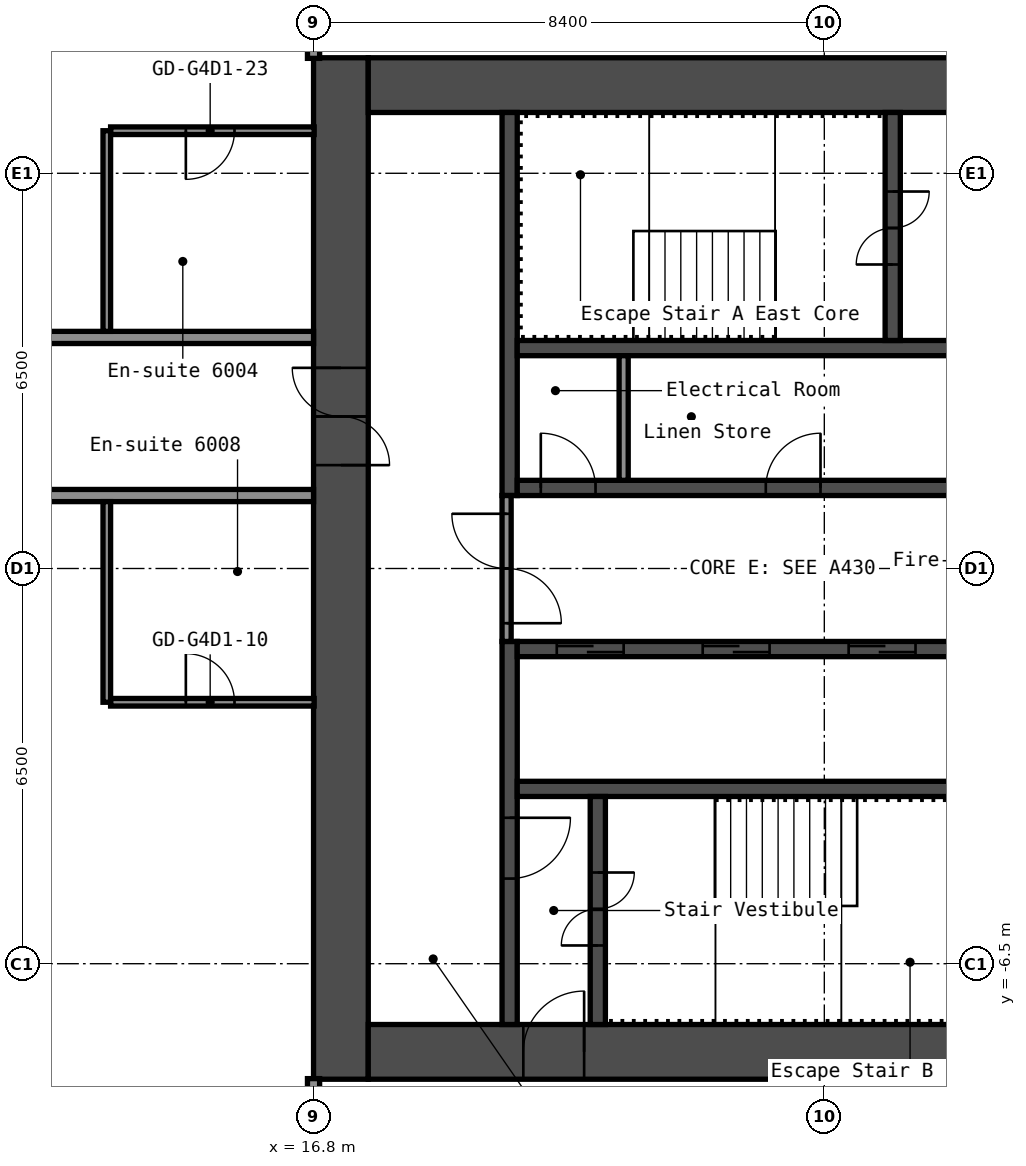
"""IFC4 building model, lengths in metres.
Left out: names, types, materials, properties, quantities, classifications, styles, units other than length and angle.
Written with IfcOpenShell. Run it as: python <this file> out.ifc"""

import sys

from ifc_helpers import new_model, si_unit, direction, frame, frame_2d, origin, place, context, subcontext, project, spatial, rectangle, extrude, element, fill, save


model = new_model("IFC4")
c1 = context("Model", 3, precision=1e-05, world=origin(), true_north=direction((0.0, 1.0)))
c2 = subcontext(c1, "Body", "Model", "MODEL_VIEW")
j1 = project(units=[si_unit("LENGTHUNIT", "METRE"), si_unit("PLANEANGLEUNIT", "RADIAN")], contexts=[c1])
p1 = place(None, origin())
s1 = spatial("IfcSite", under=j1, at=p1, CompositionType="ELEMENT")
p2 = place(p1, origin())
s2 = spatial("IfcBuilding", under=s1, at=p2, CompositionType="ELEMENT")
p3 = place(p2, frame((0.0, 0.0, 212.2)))
s3 = spatial("IfcBuildingStorey", under=s2, at=p3, CompositionType="ELEMENT", Elevation=212.2)
p4 = place(p3, frame((17.25, -8.4, 0.0), z_axis=(0.0, 0.0, 1.0), x_axis=(0.0, 1.0, 0.0)))
e1 = element("IfcWall", 1, at=p4, inside=s3, PredefinedType="SHEAR", context=c2, shape_type="SweptSolid", body=[
    extrude(rectangle(XDim=16.8, YDim=0.9, at=frame_2d((8.4, 0.0))), origin(), (0.0, 0.0, 1.0), 2.75),
])
p5 = place(p4, frame((10.1, 0.0, 0.0)))
e2 = element("IfcOpeningElement", 2, at=p5, cuts=e1, PredefinedType="OPENING", context=c2, shape_type="SweptSolid", body=[
    extrude(rectangle(XDim=1.6, YDim=2.1, at=frame_2d((0.8, 1.05))), frame((0.0, 0.46, 0.0), z_axis=(0.0, -1.0, 0.0), x_axis=(1.0, 0.0, 0.0)), (0.0, 0.0, 1.0), 0.92),
])
p6 = place(p3, frame((17.7, 7.95, 0.0), z_axis=(0.0, 0.0, 1.0), x_axis=(1.0, 0.0, 0.0)))
e3 = element("IfcWall", 3, at=p6, inside=s3, PredefinedType="SHEAR", context=c2, shape_type="SweptSolid", body=[
    extrude(rectangle(XDim=15.0, YDim=0.9, at=frame_2d((7.5, 0.0))), origin(), (0.0, 0.0, 1.0), 2.75),
])
p7 = place(p6, frame((10.4, 0.0, 0.0)))
e4 = element("IfcOpeningElement", 4, at=p7, cuts=e3, PredefinedType="OPENING", context=c2, shape_type="SweptSolid", body=[
    extrude(rectangle(XDim=1.2, YDim=2.1, at=frame_2d((0.6, 1.05))), frame((0.0, 0.46, 0.0), z_axis=(0.0, -1.0, 0.0), x_axis=(1.0, 0.0, 0.0)), (0.0, 0.0, 1.0), 0.92),
])
p8 = place(p6, frame((13.35, 0.0, 0.0)))
e5 = element("IfcOpeningElement", 5, at=p8, cuts=e3, PredefinedType="OPENING", context=c2, shape_type="SweptSolid", body=[
    extrude(rectangle(XDim=0.9, YDim=2.1, at=frame_2d((0.45, 1.05))), frame((0.0, 0.46, 0.0), z_axis=(0.0, -1.0, 0.0), x_axis=(1.0, 0.0, 0.0)), (0.0, 0.0, 1.0), 0.92),
])
p9 = place(p3, frame((17.7, -7.95, 0.0), z_axis=(0.0, 0.0, 1.0), x_axis=(1.0, 0.0, 0.0)))
e6 = element("IfcWall", 6, at=p9, inside=s3, PredefinedType="SHEAR", context=c2, shape_type="SweptSolid", body=[
    extrude(rectangle(XDim=15.0, YDim=0.9, at=frame_2d((7.5, 0.0))), origin(), (0.0, 0.0, 1.0), 2.75),
])
p10 = place(p9, frame((2.55, 0.0, 0.0)))
e7 = element("IfcOpeningElement", 7, at=p10, cuts=e6, PredefinedType="OPENING", context=c2, shape_type="SweptSolid", body=[
    extrude(rectangle(XDim=1.0, YDim=2.1, at=frame_2d((0.5, 1.05))), frame((0.0, 0.46, 0.0), z_axis=(0.0, -1.0, 0.0), x_axis=(1.0, 0.0, 0.0)), (0.0, 0.0, 1.0), 0.92),
])
p11 = place(p3, frame((20.025, 1.2, 0.0), z_axis=(0.0, 0.0, 1.0), x_axis=(0.0, 1.0, 0.0)))
e8 = element("IfcWall", 8, at=p11, inside=s3, PredefinedType="SHEAR", context=c2, shape_type="SweptSolid", body=[
    extrude(rectangle(XDim=6.3, YDim=0.25, at=frame_2d((3.15, 0.0))), origin(), (0.0, 0.0, 1.0), 2.75),
])
p12 = place(p3, frame((20.025, -7.5, 0.0), z_axis=(0.0, 0.0, 1.0), x_axis=(0.0, 1.0, 0.0)))
e9 = element("IfcWall", 9, at=p12, inside=s3, PredefinedType="SHEAR", context=c2, shape_type="SweptSolid", body=[
    extrude(rectangle(XDim=6.3, YDim=0.25, at=frame_2d((3.15, 0.0))), origin(), (0.0, 0.0, 1.0), 2.75),
])
p13 = place(p12, frame((2.4, 0.0, 0.0)))
e10 = element("IfcOpeningElement", 10, at=p13, cuts=e9, PredefinedType="OPENING", context=c2, shape_type="SweptSolid", body=[
    extrude(rectangle(XDim=1.0, YDim=2.1, at=frame_2d((0.5, 1.05))), frame((0.0, 0.135, 0.0), z_axis=(0.0, -1.0, 0.0), x_axis=(1.0, 0.0, 0.0)), (0.0, 0.0, 1.0), 0.27),
])
p14 = place(p3, frame((20.15, 1.325, 0.0), z_axis=(0.0, 0.0, 1.0), x_axis=(1.0, 0.0, 0.0)))
e11 = element("IfcWall", 11, at=p14, inside=s3, PredefinedType="SHEAR", context=c2, shape_type="SweptSolid", body=[
    extrude(rectangle(XDim=7.5, YDim=0.25, at=frame_2d((3.75, 0.0))), origin(), (0.0, 0.0, 1.0), 2.75),
])
p15 = place(p14, frame((0.387, 0.0, 0.0)))
e12 = element("IfcOpeningElement", 12, at=p15, cuts=e11, PredefinedType="OPENING", context=c2, shape_type="SweptSolid", body=[
    extrude(rectangle(XDim=0.9, YDim=2.1, at=frame_2d((0.45, 1.05))), frame((0.0, 0.135, 0.0), z_axis=(0.0, -1.0, 0.0), x_axis=(1.0, 0.0, 0.0)), (0.0, 0.0, 1.0), 0.27),
])
p16 = place(p14, frame((4.087, 0.0, 0.0)))
e13 = element("IfcOpeningElement", 13, at=p16, cuts=e11, PredefinedType="OPENING", context=c2, shape_type="SweptSolid", body=[
    extrude(rectangle(XDim=0.9, YDim=2.1, at=frame_2d((0.45, 1.05))), frame((0.0, 0.135, 0.0), z_axis=(0.0, -1.0, 0.0), x_axis=(1.0, 0.0, 0.0)), (0.0, 0.0, 1.0), 0.27),
])
p17 = place(p3, frame((20.15, 3.625, 0.0), z_axis=(0.0, 0.0, 1.0), x_axis=(1.0, 0.0, 0.0)))
e14 = element("IfcWall", 14, at=p17, inside=s3, PredefinedType="SHEAR", context=c2, shape_type="SweptSolid", body=[
    extrude(rectangle(XDim=7.5, YDim=0.25, at=frame_2d((3.75, 0.0))), origin(), (0.0, 0.0, 1.0), 2.75),
])
p18 = place(p3, frame((26.325, 3.75, 0.0), z_axis=(0.0, 0.0, 1.0), x_axis=(0.0, 1.0, 0.0)))
e15 = element("IfcWall", 15, at=p18, inside=s3, PredefinedType="SHEAR", context=c2, shape_type="SweptSolid", body=[
    extrude(rectangle(XDim=3.75, YDim=0.25, at=frame_2d((1.875, 0.0))), origin(), (0.0, 0.0, 1.0), 2.75),
])
p19 = place(p18, frame((1.25, 0.0, 0.0)))
e16 = element("IfcOpeningElement", 16, at=p19, cuts=e15, PredefinedType="OPENING", context=c2, shape_type="SweptSolid", body=[
    extrude(rectangle(XDim=1.2, YDim=2.1, at=frame_2d((0.6, 1.05))), frame((0.0, 0.135, 0.0), z_axis=(0.0, -1.0, 0.0), x_axis=(1.0, 0.0, 0.0)), (0.0, 0.0, 1.0), 0.27),
])
p20 = place(p3, frame((20.15, -1.325, 0.0), z_axis=(0.0, 0.0, 1.0), x_axis=(1.0, 0.0, 0.0)))
e17 = element("IfcWall", 17, at=p20, inside=s3, PredefinedType="SHEAR", context=c2, shape_type="SweptSolid", body=[
    extrude(rectangle(XDim=7.5, YDim=0.25, at=frame_2d((3.75, 0.0))), origin(), (0.0, 0.0, 1.0), 2.75),
])
p21 = place(p20, frame((0.65, 0.0, 0.0)))
e18 = element("IfcOpeningElement", 18, at=p21, cuts=e17, PredefinedType="OPENING", context=c2, shape_type="SweptSolid", body=[
    extrude(rectangle(XDim=1.1, YDim=2.1, at=frame_2d((0.55, 1.05))), frame((0.0, 0.135, 0.0), z_axis=(0.0, -1.0, 0.0), x_axis=(1.0, 0.0, 0.0)), (0.0, 0.0, 1.0), 0.27),
])
p22 = place(p20, frame((3.05, 0.0, 0.0)))
e19 = element("IfcOpeningElement", 19, at=p22, cuts=e17, PredefinedType="OPENING", context=c2, shape_type="SweptSolid", body=[
    extrude(rectangle(XDim=1.1, YDim=2.1, at=frame_2d((0.55, 1.05))), frame((0.0, 0.135, 0.0), z_axis=(0.0, -1.0, 0.0), x_axis=(1.0, 0.0, 0.0)), (0.0, 0.0, 1.0), 0.27),
])
p23 = place(p20, frame((5.45, 0.0, 0.0)))
e20 = element("IfcOpeningElement", 20, at=p23, cuts=e17, PredefinedType="OPENING", context=c2, shape_type="SweptSolid", body=[
    extrude(rectangle(XDim=1.1, YDim=2.1, at=frame_2d((0.55, 1.05))), frame((0.0, 0.135, 0.0), z_axis=(0.0, -1.0, 0.0), x_axis=(1.0, 0.0, 0.0)), (0.0, 0.0, 1.0), 0.27),
])
p24 = place(p3, frame((20.15, -3.625, 0.0), z_axis=(0.0, 0.0, 1.0), x_axis=(1.0, 0.0, 0.0)))
e21 = element("IfcWall", 21, at=p24, inside=s3, PredefinedType="SHEAR", context=c2, shape_type="SweptSolid", body=[
    extrude(rectangle(XDim=7.5, YDim=0.25, at=frame_2d((3.75, 0.0))), origin(), (0.0, 0.0, 1.0), 2.75),
])
p25 = place(p3, frame((21.475, -7.5, 0.0), z_axis=(0.0, 0.0, 1.0), x_axis=(0.0, 1.0, 0.0)))
e22 = element("IfcWall", 22, at=p25, inside=s3, PredefinedType="SHEAR", context=c2, shape_type="SweptSolid", body=[
    extrude(rectangle(XDim=3.75, YDim=0.25, at=frame_2d((1.875, 0.0))), origin(), (0.0, 0.0, 1.0), 2.75),
])
p26 = place(p25, frame((1.3, 0.0, 0.0)))
e23 = element("IfcOpeningElement", 23, at=p26, cuts=e22, PredefinedType="OPENING", context=c2, shape_type="SweptSolid", body=[
    extrude(rectangle(XDim=1.2, YDim=2.1, at=frame_2d((0.6, 1.05))), frame((0.0, 0.135, 0.0), z_axis=(0.0, -1.0, 0.0), x_axis=(1.0, 0.0, 0.0)), (0.0, 0.0, 1.0), 0.27),
])
p27 = place(p3, frame((19.975, -1.2, 0.0), z_axis=(0.0, 0.0, 1.0), x_axis=(0.0, 1.0, 0.0)))
e24 = element("IfcWall", 24, at=p27, inside=s3, PredefinedType="PARTITIONING", context=c2, shape_type="SweptSolid", body=[
    extrude(rectangle(XDim=2.4, YDim=0.15, at=frame_2d((1.2, 0.0))), origin(), (0.0, 0.0, 1.0), 2.75),
])
p28 = place(p27, frame((0.3, 0.0, 0.0)))
e25 = element("IfcOpeningElement", 25, at=p28, cuts=e24, PredefinedType="OPENING", context=c2, shape_type="SweptSolid", body=[
    extrude(rectangle(XDim=1.8, YDim=2.1, at=frame_2d((0.9, 1.05))), frame((0.0, 0.085, 0.0), z_axis=(0.0, -1.0, 0.0), x_axis=(1.0, 0.0, 0.0)), (0.0, 0.0, 1.0), 0.17),
])
p29 = place(p3, frame((21.9, 1.45, 0.0), z_axis=(0.0, 0.0, 1.0), x_axis=(0.0, 1.0, 0.0)))
e26 = element("IfcWall", 26, at=p29, inside=s3, PredefinedType="PARTITIONING", context=c2, shape_type="SweptSolid", body=[
    extrude(rectangle(XDim=2.05, YDim=0.15, at=frame_2d((1.025, 0.0))), origin(), (0.0, 0.0, 1.0), 2.75),
])
p30 = place(p3, frame((13.462, -2.2, 0.0), z_axis=(0.0, 0.0, 1.0), x_axis=(1.0, 0.0, 0.0)))
e27 = element("IfcWall", 27, at=p30, inside=s3, PredefinedType="PARTITIONING", context=c2, shape_type="SweptSolid", body=[
    extrude(rectangle(XDim=3.348, YDim=0.125, at=frame_2d((1.674, 0.0))), origin(), (0.0, 0.0, 1.0), 2.75),
])
p31 = place(p30, frame((1.238, 0.0, 0.0)))
e28 = element("IfcOpeningElement", 28, at=p31, cuts=e27, PredefinedType="OPENING", context=c2, shape_type="SweptSolid", body=[
    extrude(rectangle(XDim=0.8, YDim=2.1, at=frame_2d((0.4, 1.05))), frame((0.0, 0.073, 0.0), z_axis=(0.0, -1.0, 0.0), x_axis=(1.0, 0.0, 0.0)), (0.0, 0.0, 1.0), 0.145),
])
p32 = place(p3, frame((-16.8, 1.2, 0.0), z_axis=(0.0, 0.0, 1.0), x_axis=(1.0, 0.0, 0.0)))
e29 = element("IfcWall", 29, at=p32, inside=s3, PredefinedType="PARTITIONING", context=c2, shape_type="SweptSolid", body=[
    extrude(rectangle(XDim=33.6, YDim=0.2, at=frame_2d((16.8, 0.0))), origin(), (0.0, 0.0, 1.0), 2.75),
])
p33 = place(p32, frame((2.85, 0.0, 0.0)))
e30 = element("IfcOpeningElement", 30, at=p33, cuts=e29, PredefinedType="OPENING", context=c2, shape_type="SweptSolid", body=[
    extrude(rectangle(XDim=1.0, YDim=2.1, at=frame_2d((0.5, 1.05))), frame((0.0, 0.11, 0.0), z_axis=(0.0, -1.0, 0.0), x_axis=(1.0, 0.0, 0.0)), (0.0, 0.0, 1.0), 0.22),
])
p34 = place(p32, frame((4.55, 0.0, 0.0)))
e31 = element("IfcOpeningElement", 31, at=p34, cuts=e29, PredefinedType="OPENING", context=c2, shape_type="SweptSolid", body=[
    extrude(rectangle(XDim=1.0, YDim=2.1, at=frame_2d((0.5, 1.05))), frame((0.0, 0.11, 0.0), z_axis=(0.0, -1.0, 0.0), x_axis=(1.0, 0.0, 0.0)), (0.0, 0.0, 1.0), 0.22),
])
p35 = place(p32, frame((12.1, 0.0, 0.0)))
e32 = element("IfcOpeningElement", 32, at=p35, cuts=e29, PredefinedType="OPENING", context=c2, shape_type="SweptSolid", body=[
    extrude(rectangle(XDim=1.0, YDim=2.1, at=frame_2d((0.5, 1.05))), frame((0.0, 0.11, 0.0), z_axis=(0.0, -1.0, 0.0), x_axis=(1.0, 0.0, 0.0)), (0.0, 0.0, 1.0), 0.22),
])
p36 = place(p32, frame((22.3, 0.0, 0.0)))
e33 = element("IfcOpeningElement", 33, at=p36, cuts=e29, PredefinedType="OPENING", context=c2, shape_type="SweptSolid", body=[
    extrude(rectangle(XDim=1.0, YDim=2.1, at=frame_2d((0.5, 1.05))), frame((0.0, 0.11, 0.0), z_axis=(0.0, -1.0, 0.0), x_axis=(1.0, 0.0, 0.0)), (0.0, 0.0, 1.0), 0.22),
])
p37 = place(p32, frame((27.2, 0.0, 0.0)))
e34 = element("IfcOpeningElement", 34, at=p37, cuts=e29, PredefinedType="OPENING", context=c2, shape_type="SweptSolid", body=[
    extrude(rectangle(XDim=1.0, YDim=2.1, at=frame_2d((0.5, 1.05))), frame((0.0, 0.11, 0.0), z_axis=(0.0, -1.0, 0.0), x_axis=(1.0, 0.0, 0.0)), (0.0, 0.0, 1.0), 0.22),
])
p38 = place(p3, frame((-16.8, 3.8, 0.0), z_axis=(0.0, 0.0, 1.0), x_axis=(1.0, 0.0, 0.0)))
e35 = element("IfcWall", 35, at=p38, inside=s3, PredefinedType="PARTITIONING", context=c2, shape_type="SweptSolid", body=[
    extrude(rectangle(XDim=33.6, YDim=0.2, at=frame_2d((16.8, 0.0))), origin(), (0.0, 0.0, 1.0), 2.75),
])
p39 = place(p38, frame((2.85, 0.0, 0.0)))
e36 = element("IfcOpeningElement", 36, at=p39, cuts=e35, PredefinedType="OPENING", context=c2, shape_type="SweptSolid", body=[
    extrude(rectangle(XDim=1.0, YDim=2.1, at=frame_2d((0.5, 1.05))), frame((0.0, 0.11, 0.0), z_axis=(0.0, -1.0, 0.0), x_axis=(1.0, 0.0, 0.0)), (0.0, 0.0, 1.0), 0.22),
])
p40 = place(p38, frame((4.55, 0.0, 0.0)))
e37 = element("IfcOpeningElement", 37, at=p40, cuts=e35, PredefinedType="OPENING", context=c2, shape_type="SweptSolid", body=[
    extrude(rectangle(XDim=1.0, YDim=2.1, at=frame_2d((0.5, 1.05))), frame((0.0, 0.11, 0.0), z_axis=(0.0, -1.0, 0.0), x_axis=(1.0, 0.0, 0.0)), (0.0, 0.0, 1.0), 0.22),
])
p41 = place(p38, frame((10.4, 0.0, 0.0)))
e38 = element("IfcOpeningElement", 38, at=p41, cuts=e35, PredefinedType="OPENING", context=c2, shape_type="SweptSolid", body=[
    extrude(rectangle(XDim=1.0, YDim=2.1, at=frame_2d((0.5, 1.05))), frame((0.0, 0.11, 0.0), z_axis=(0.0, -1.0, 0.0), x_axis=(1.0, 0.0, 0.0)), (0.0, 0.0, 1.0), 0.22),
])
p42 = place(p38, frame((19.65, 0.0, 0.0)))
e39 = element("IfcOpeningElement", 39, at=p42, cuts=e35, PredefinedType="OPENING", context=c2, shape_type="SweptSolid", body=[
    extrude(rectangle(XDim=1.0, YDim=2.1, at=frame_2d((0.5, 1.05))), frame((0.0, 0.11, 0.0), z_axis=(0.0, -1.0, 0.0), x_axis=(1.0, 0.0, 0.0)), (0.0, 0.0, 1.0), 0.22),
])
p43 = place(p38, frame((21.35, 0.0, 0.0)))
e40 = element("IfcOpeningElement", 40, at=p43, cuts=e35, PredefinedType="OPENING", context=c2, shape_type="SweptSolid", body=[
    extrude(rectangle(XDim=1.0, YDim=2.1, at=frame_2d((0.5, 1.05))), frame((0.0, 0.11, 0.0), z_axis=(0.0, -1.0, 0.0), x_axis=(1.0, 0.0, 0.0)), (0.0, 0.0, 1.0), 0.22),
])
p44 = place(p38, frame((27.2, 0.0, 0.0)))
e41 = element("IfcOpeningElement", 41, at=p44, cuts=e35, PredefinedType="OPENING", context=c2, shape_type="SweptSolid", body=[
    extrude(rectangle(XDim=1.0, YDim=2.1, at=frame_2d((0.5, 1.05))), frame((0.0, 0.11, 0.0), z_axis=(0.0, -1.0, 0.0), x_axis=(1.0, 0.0, 0.0)), (0.0, 0.0, 1.0), 0.22),
])
p45 = place(p3, frame((13.462, 7.2, 0.0), z_axis=(0.0, 0.0, 1.0), x_axis=(1.0, 0.0, 0.0)))
e42 = element("IfcWall", 42, at=p45, inside=s3, PredefinedType="PARTITIONING", context=c2, shape_type="SweptSolid", body=[
    extrude(rectangle(XDim=3.348, YDim=0.125, at=frame_2d((1.674, 0.0))), origin(), (0.0, 0.0, 1.0), 2.75),
])
p46 = place(p45, frame((1.238, 0.0, 0.0)))
e43 = element("IfcOpeningElement", 43, at=p46, cuts=e42, PredefinedType="OPENING", context=c2, shape_type="SweptSolid", body=[
    extrude(rectangle(XDim=0.8, YDim=2.1, at=frame_2d((0.4, 1.05))), frame((0.0, 0.073, 0.0), z_axis=(0.0, -1.0, 0.0), x_axis=(1.0, 0.0, 0.0)), (0.0, 0.0, 1.0), 0.145),
])
for number, where, z_axis, x_axis in (
    (44, (13.4, -2.2, 0.0), (0.0, 0.0, 1.0), (0.0, 1.0, 0.0)),
    (45, (13.4, 3.9, 0.0), (0.0, 0.0, 1.0), (0.0, 1.0, 0.0)),
):
    element("IfcWall", number, at=place(p3, frame(where, z_axis=z_axis, x_axis=x_axis)), inside=s3, PredefinedType="PARTITIONING", context=c2, shape_type="SweptSolid", body=[
        extrude(rectangle(XDim=3.3, YDim=0.125, at=frame_2d((1.65, 0.0))), origin(), (0.0, 0.0, 1.0), 2.75),
    ])
p47 = place(p3, frame((16.8, -15.55, 0.0), z_axis=(0.0, 0.0, 1.0), x_axis=(0.0, 1.0, 0.0)))
e46 = element("IfcWall", 46, at=p47, inside=s3, PredefinedType="PARTITIONING", context=c2, shape_type="SweptSolid", body=[
    extrude(rectangle(XDim=7.16, YDim=0.2, at=frame_2d((3.58, 0.0))), origin(), (0.0, 0.0, 1.0), 2.75),
])
p48 = place(p3, frame((16.8, 8.39, 0.0), z_axis=(0.0, 0.0, 1.0), x_axis=(0.0, 1.0, 0.0)))
e47 = element("IfcWall", 47, at=p48, inside=s3, PredefinedType="PARTITIONING", context=c2, shape_type="SweptSolid", body=[
    extrude(rectangle(XDim=12.16, YDim=0.2, at=frame_2d((6.08, 0.0))), origin(), (0.0, 0.0, 1.0), 2.75),
])
p49 = place(p5, origin())
e48 = element("IfcDoor", 48, at=p49, inside=s3, OperationType="DOUBLE_DOOR_SINGLE_SWING", PredefinedType="DOOR", context=c2, shape_type="SweptSolid", body=[
    extrude(rectangle(XDim=1.6, YDim=2.1, at=frame_2d((0.8, 1.05))), frame((0.0, 0.025, 0.0), z_axis=(0.0, -1.0, 0.0), x_axis=(1.0, 0.0, 0.0)), (0.0, 0.0, 1.0), 0.05),
])
fill(e2, e48)
p50 = place(p10, origin())
e49 = element("IfcDoor", 49, at=p50, inside=s3, OperationType="SINGLE_SWING_LEFT", PredefinedType="DOOR", context=c2, shape_type="SweptSolid", body=[
    extrude(rectangle(XDim=1.0, YDim=2.1, at=frame_2d((0.5, 1.05))), frame((0.0, 0.025, 0.0), z_axis=(0.0, -1.0, 0.0), x_axis=(1.0, 0.0, 0.0)), (0.0, 0.0, 1.0), 0.05),
])
fill(e7, e49)
p51 = place(p19, origin())
e50 = element("IfcDoor", 50, at=p51, inside=s3, OperationType="DOUBLE_DOOR_SINGLE_SWING", PredefinedType="DOOR", context=c2, shape_type="SweptSolid", body=[
    extrude(rectangle(XDim=1.2, YDim=2.1, at=frame_2d((0.6, 1.05))), frame((0.0, 0.025, 0.0), z_axis=(0.0, -1.0, 0.0), x_axis=(1.0, 0.0, 0.0)), (0.0, 0.0, 1.0), 0.05),
])
fill(e16, e50)
p52 = place(p26, origin())
e51 = element("IfcDoor", 51, at=p52, inside=s3, OperationType="DOUBLE_DOOR_SINGLE_SWING", PredefinedType="DOOR", context=c2, shape_type="SweptSolid", body=[
    extrude(rectangle(XDim=1.2, YDim=2.1, at=frame_2d((0.6, 1.05))), frame((0.0, 0.025, 0.0), z_axis=(0.0, -1.0, 0.0), x_axis=(1.0, 0.0, 0.0)), (0.0, 0.0, 1.0), 0.05),
])
fill(e23, e51)
p53 = place(p13, origin())
e52 = element("IfcDoor", 52, at=p53, inside=s3, OperationType="SINGLE_SWING_RIGHT", PredefinedType="DOOR", context=c2, shape_type="SweptSolid", body=[
    extrude(rectangle(XDim=1.0, YDim=2.1, at=frame_2d((0.5, 1.05))), frame((0.0, 0.025, 0.0), z_axis=(0.0, -1.0, 0.0), x_axis=(1.0, 0.0, 0.0)), (0.0, 0.0, 1.0), 0.05),
])
fill(e10, e52)
p54 = place(p28, origin())
e53 = element("IfcDoor", 53, at=p54, inside=s3, OperationType="DOUBLE_DOOR_SINGLE_SWING", PredefinedType="DOOR", context=c2, shape_type="SweptSolid", body=[
    extrude(rectangle(XDim=1.8, YDim=2.1, at=frame_2d((0.9, 1.05))), frame((0.0, 0.025, 0.0), z_axis=(0.0, -1.0, 0.0), x_axis=(1.0, 0.0, 0.0)), (0.0, 0.0, 1.0), 0.05),
])
fill(e25, e53)
p55 = place(p15, origin())
e54 = element("IfcDoor", 54, at=p55, inside=s3, OperationType="SINGLE_SWING_RIGHT", PredefinedType="DOOR", context=c2, shape_type="SweptSolid", body=[
    extrude(rectangle(XDim=0.9, YDim=2.1, at=frame_2d((0.45, 1.05))), frame((0.0, 0.025, 0.0), z_axis=(0.0, -1.0, 0.0), x_axis=(1.0, 0.0, 0.0)), (0.0, 0.0, 1.0), 0.05),
])
fill(e12, e54)
p56 = place(p16, origin())
e55 = element("IfcDoor", 55, at=p56, inside=s3, OperationType="SINGLE_SWING_LEFT", PredefinedType="DOOR", context=c2, shape_type="SweptSolid", body=[
    extrude(rectangle(XDim=0.9, YDim=2.1, at=frame_2d((0.45, 1.05))), frame((0.0, 0.025, 0.0), z_axis=(0.0, -1.0, 0.0), x_axis=(1.0, 0.0, 0.0)), (0.0, 0.0, 1.0), 0.05),
])
fill(e13, e55)
p57 = place(p21, origin())
e56 = element("IfcDoor", 56, at=p57, inside=s3, OperationType="DOUBLE_DOOR_SLIDING", PredefinedType="DOOR", context=c2, shape_type="SweptSolid", body=[
    extrude(rectangle(XDim=1.1, YDim=2.1, at=frame_2d((0.55, 1.05))), frame((0.0, 0.025, 0.0), z_axis=(0.0, -1.0, 0.0), x_axis=(1.0, 0.0, 0.0)), (0.0, 0.0, 1.0), 0.05),
])
fill(e18, e56)
p58 = place(p22, origin())
e57 = element("IfcDoor", 57, at=p58, inside=s3, OperationType="DOUBLE_DOOR_SLIDING", PredefinedType="DOOR", context=c2, shape_type="SweptSolid", body=[
    extrude(rectangle(XDim=1.1, YDim=2.1, at=frame_2d((0.55, 1.05))), frame((0.0, 0.025, 0.0), z_axis=(0.0, -1.0, 0.0), x_axis=(1.0, 0.0, 0.0)), (0.0, 0.0, 1.0), 0.05),
])
fill(e19, e57)
p59 = place(p23, origin())
e58 = element("IfcDoor", 58, at=p59, inside=s3, OperationType="DOUBLE_DOOR_SLIDING", PredefinedType="DOOR", context=c2, shape_type="SweptSolid", body=[
    extrude(rectangle(XDim=1.1, YDim=2.1, at=frame_2d((0.55, 1.05))), frame((0.0, 0.025, 0.0), z_axis=(0.0, -1.0, 0.0), x_axis=(1.0, 0.0, 0.0)), (0.0, 0.0, 1.0), 0.05),
])
fill(e20, e58)
p60 = place(p31, origin())
e59 = element("IfcDoor", 59, at=p60, inside=s3, OperationType="SINGLE_SWING_RIGHT", PredefinedType="DOOR", context=c2, shape_type="SweptSolid", body=[
    extrude(rectangle(XDim=0.8, YDim=2.1, at=frame_2d((0.4, 1.05))), frame((0.0, 0.025, 0.0), z_axis=(0.0, -1.0, 0.0), x_axis=(1.0, 0.0, 0.0)), (0.0, 0.0, 1.0), 0.05),
])
fill(e28, e59)
p61 = place(p46, origin())
e60 = element("IfcDoor", 60, at=p61, inside=s3, OperationType="SINGLE_SWING_LEFT", PredefinedType="DOOR", context=c2, shape_type="SweptSolid", body=[
    extrude(rectangle(XDim=0.8, YDim=2.1, at=frame_2d((0.4, 1.05))), frame((0.0, 0.025, 0.0), z_axis=(0.0, -1.0, 0.0), x_axis=(1.0, 0.0, 0.0)), (0.0, 0.0, 1.0), 0.05),
])
fill(e43, e60)
save(model, sys.argv[1])
